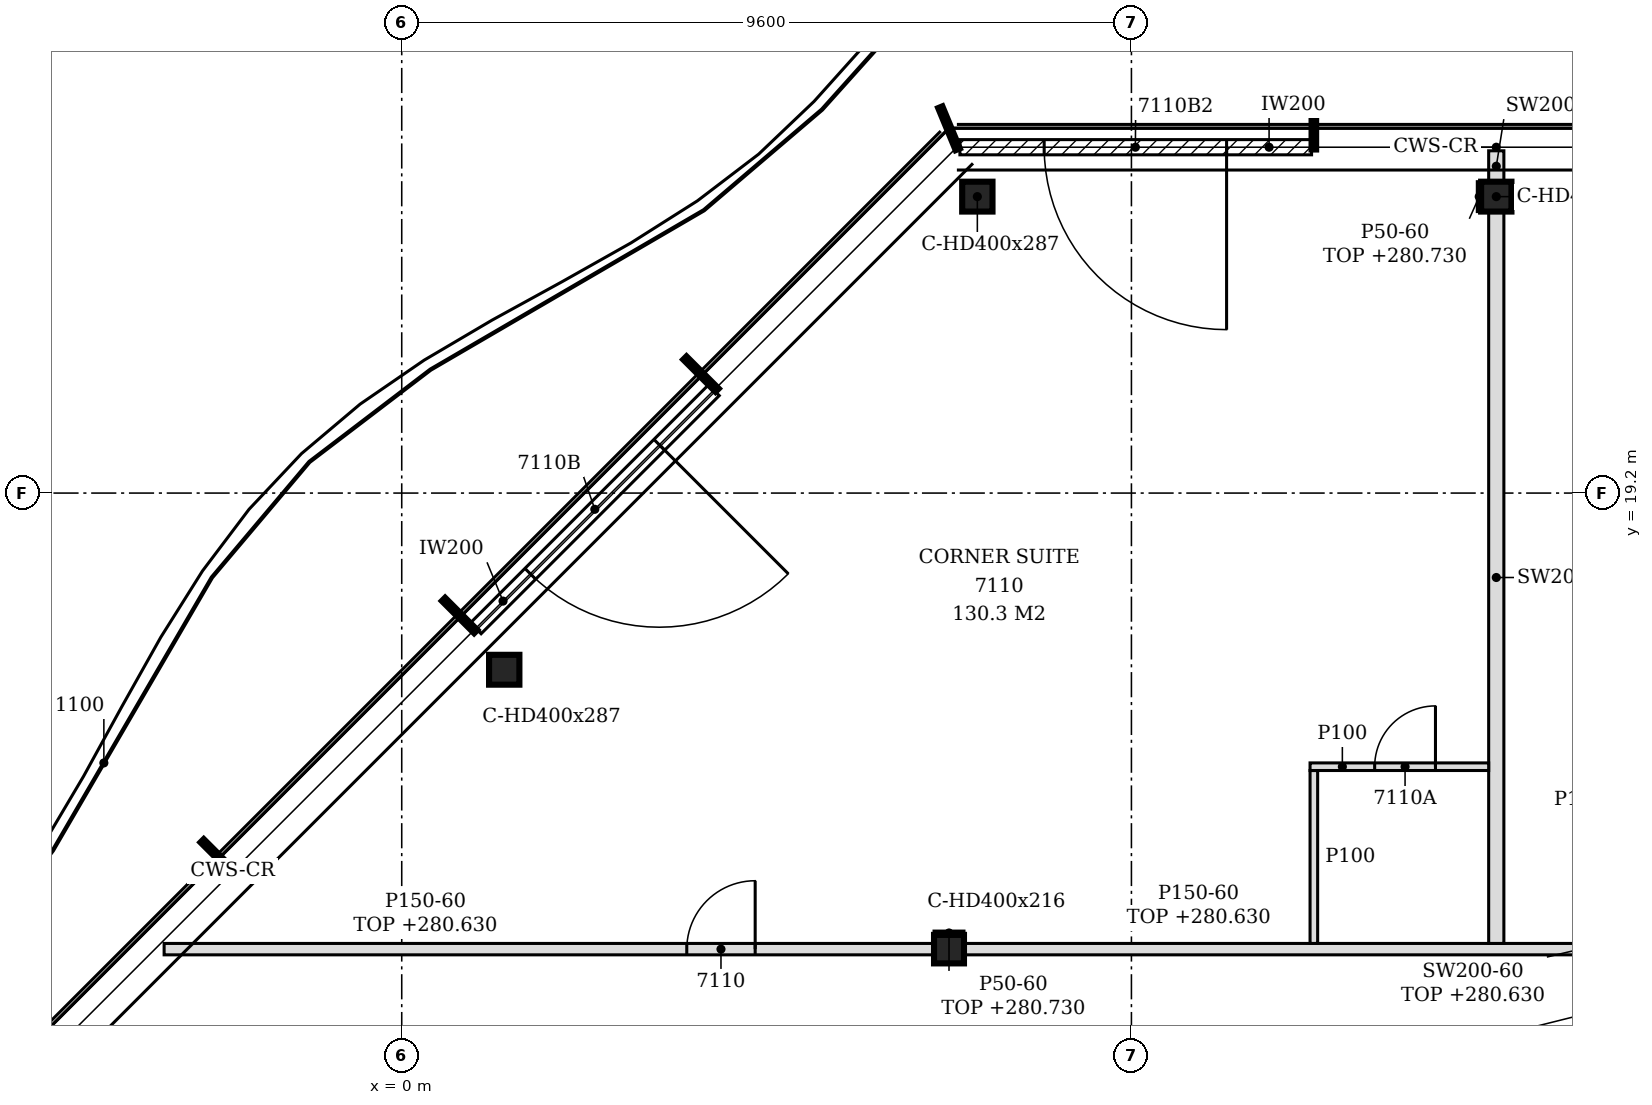
"""IFC4 building model, lengths in metres.
Left out: names, types, materials, properties, quantities, classifications, styles, units other than length and angle.
Written with IfcOpenShell. Run it as: python <this file> out.ifc"""

import sys

from ifc_helpers import new_model, si_unit, direction, frame, frame_2d, origin, origin_2d, place, context, subcontext, project, spatial, polyline, rectangle, i_section, outline, extrude, element, fill, save


model = new_model("IFC4")
c1 = context("Model", 3, precision=1e-05, world=origin(), true_north=direction((0.0, 1.0)))
c2 = subcontext(c1, "Body", "Model", "MODEL_VIEW")
j1 = project(units=[si_unit("LENGTHUNIT", "METRE"), si_unit("PLANEANGLEUNIT", "RADIAN")], contexts=[c1])
p1 = place(None, origin())
s1 = spatial("IfcSite", under=j1, at=p1, CompositionType="ELEMENT")
p2 = place(p1, origin())
s2 = spatial("IfcBuilding", under=s1, at=p2, CompositionType="ELEMENT")
p3 = place(p2, frame((0.0, 0.0, 277.8)))
s3 = spatial("IfcBuildingStorey", under=s2, at=p3, CompositionType="ELEMENT", Elevation=277.8)
for number, where, z_axis, x_axis in (
    (1, (14.4, 23.1, -0.15), (0.0, 0.0, 1.0), (1.0, 0.0, 0.0)),
    (2, (7.573, 23.1, -0.15), (0.0, 0.0, 1.0), (1.0, 0.0, 0.0)),
    (3, (1.348, 16.876, -0.15), (0.0, 0.0, 1.0), (1.0, 0.0, 0.0)),
):
    element("IfcColumn", number, at=place(p3, frame(where, z_axis=z_axis, x_axis=x_axis)), inside=s3, PredefinedType="COLUMN", context=c2, shape_type="SweptSolid", body=[
        extrude(i_section(OverallWidth=0.399, OverallDepth=0.393, WebThickness=0.023, FlangeThickness=0.037, FilletRadius=0.015, at=origin_2d()), origin(), (0.0, 0.0, 1.0), 3.6),
    ])
p4 = place(p3, frame((7.2, 13.2, -0.15), z_axis=(0.0, 0.0, 1.0), x_axis=(1.0, 0.0, 0.0)))
e4 = element("IfcColumn", 4, at=p4, inside=s3, PredefinedType="COLUMN", context=c2, shape_type="SweptSolid", body=[
    extrude(i_section(OverallWidth=0.394, OverallDepth=0.375, WebThickness=0.017, FlangeThickness=0.028, FilletRadius=0.015, at=origin_2d()), origin(), (0.0, 0.0, 1.0), 3.6),
])
p5 = place(p3, frame((11.97, 23.75, 0.0), z_axis=(0.0, 0.0, 1.0), x_axis=(-1.0, 0.0, 0.0)))
e5 = element("IfcWall", 5, at=p5, inside=s3, PredefinedType="NOTDEFINED", context=c2, shape_type="SweptSolid", body=[
    extrude(rectangle(XDim=4.626, YDim=0.2, at=frame_2d((2.313, 0.0))), origin(), (0.0, 0.0, 1.0), 3.45),
])
p6 = place(p5, frame((1.118, 0.0, 0.0)))
e6 = element("IfcOpeningElement", 6, at=p6, cuts=e5, PredefinedType="OPENING", context=c2, shape_type="SweptSolid", body=[
    extrude(rectangle(XDim=2.4, YDim=2.4, at=frame_2d((1.2, 1.2))), frame((0.0, 0.11, 0.0), z_axis=(0.0, -1.0, 0.0), x_axis=(1.0, 0.0, 0.0)), (0.0, 0.0, 1.0), 0.22),
])
p7 = place(p3, frame((4.107, 20.553, 0.0), z_axis=(0.0, 0.0, 1.0), x_axis=(-0.707079231393, -0.707134329907, 0.0)))
e7 = element("IfcWall", 7, at=p7, inside=s3, PredefinedType="NOTDEFINED", context=c2, shape_type="SweptSolid", body=[
    extrude(rectangle(XDim=4.431, YDim=0.2, at=frame_2d((2.215, 0.0))), origin(), (0.0, 0.0, 1.0), 3.45),
])
p8 = place(p7, frame((1.015, 0.0, 0.0)))
e8 = element("IfcOpeningElement", 8, at=p8, cuts=e7, PredefinedType="OPENING", context=c2, shape_type="SweptSolid", body=[
    extrude(rectangle(XDim=2.4, YDim=2.4, at=frame_2d((1.2, 1.2))), frame((0.0, 0.11, 0.0), z_axis=(0.0, -1.0, 0.0), x_axis=(1.0, 0.0, 0.0)), (0.0, 0.0, 1.0), 0.22),
])
p9 = place(p3, frame((-3.126, 13.2, 0.0), z_axis=(0.0, 0.0, 1.0), x_axis=(1.0, 0.0, 0.0)))
e9 = element("IfcWall", 9, at=p9, inside=s3, PredefinedType="PARTITIONING", context=c2, shape_type="SweptSolid", body=[
    extrude(outline(polyline([(0.0, 0.0), (10.129, 0.0), (10.129, 2.83), (1.369, 2.83), (1.367, 2.63), (0.229, 2.63), (0.227, 2.83), (0.0, 2.83), (0.0, 0.0)])), frame((0.0, 0.075, 0.0), z_axis=(0.0, -1.0, 0.0), x_axis=(1.0, 0.0, 0.0)), (0.0, 0.0, 1.0), 0.15),
])
p10 = place(p9, frame((6.876, 0.0, 0.0)))
e10 = element("IfcOpeningElement", 10, at=p10, cuts=e9, PredefinedType="OPENING", context=c2, shape_type="SweptSolid", body=[
    extrude(rectangle(XDim=0.9, YDim=2.1, at=frame_2d((0.45, 1.05))), frame((0.0, 0.085, 0.0), z_axis=(0.0, -1.0, 0.0), x_axis=(1.0, 0.0, 0.0)), (0.0, 0.0, 1.0), 0.17),
])
p11 = place(p3, frame((7.397, 13.2, 0.0), z_axis=(0.0, 0.0, 1.0), x_axis=(1.0, 0.0, 0.0)))
e11 = element("IfcWall", 11, at=p11, inside=s3, PredefinedType="PARTITIONING", context=c2, shape_type="SweptSolid", body=[
    extrude(rectangle(XDim=11.606, YDim=0.15, at=frame_2d((5.803, 0.0))), origin(), (0.0, 0.0, 1.0), 2.83),
])
p12 = place(p11, frame((8.129, 0.0, 0.0)))
e12 = element("IfcOpeningElement", 12, at=p12, cuts=e11, PredefinedType="OPENING", context=c2, shape_type="SweptSolid", body=[
    extrude(rectangle(XDim=0.9, YDim=2.1, at=frame_2d((0.45, 1.05))), frame((0.0, 0.085, 0.0), z_axis=(0.0, -1.0, 0.0), x_axis=(1.0, 0.0, 0.0)), (0.0, 0.0, 1.0), 0.17),
])
p13 = place(p3, frame((12.0, 13.275, 0.0), z_axis=(0.0, 0.0, 1.0), x_axis=(0.0, 1.0, 0.0)))
e13 = element("IfcWall", 13, at=p13, inside=s3, PredefinedType="PARTITIONING", context=c2, shape_type="SweptSolid", body=[
    extrude(outline(polyline([(0.0, 0.0), (2.275, 0.0), (2.275, 3.45), (0.075, 3.45), (0.073, 2.83), (0.0, 2.83), (0.0, 0.0)])), frame((0.0, 0.05, 0.0), z_axis=(0.0, -1.0, 0.0), x_axis=(1.0, 0.0, 0.0)), (0.0, 0.0, 1.0), 0.1),
])
p14 = place(p3, frame((14.4, 13.275, 0.0), z_axis=(0.0, 0.0, 1.0), x_axis=(0.0, 1.0, 0.0)))
e14 = element("IfcWall", 14, at=p14, inside=s3, PredefinedType="PARTITIONING", context=c2, shape_type="SweptSolid", body=[
    extrude(outline(polyline([(0.0, 0.0), (9.629, 0.0), (9.628, 3.45), (6.03, 3.45), (6.028, 2.88), (5.82, 2.88), (5.818, 3.45), (0.075, 3.45), (0.073, 2.83), (0.0, 2.83), (0.0, 0.0)])), frame((0.0, 0.1, 0.0), z_axis=(0.0, -1.0, 0.0), x_axis=(1.0, 0.0, 0.0)), (0.0, 0.0, 1.0), 0.2),
])
p15 = place(p3, frame((11.95, 15.6, 0.0), z_axis=(0.0, 0.0, 1.0), x_axis=(1.0, 0.0, 0.0)))
e15 = element("IfcWall", 15, at=p15, inside=s3, PredefinedType="PARTITIONING", context=c2, shape_type="SweptSolid", body=[
    extrude(rectangle(XDim=2.35, YDim=0.1, at=frame_2d((1.175, 0.0))), origin(), (0.0, 0.0, 1.0), 3.45),
])
p16 = place(p15, frame((0.85, 0.0, 0.0)))
e16 = element("IfcOpeningElement", 16, at=p16, cuts=e15, PredefinedType="OPENING", context=c2, shape_type="SweptSolid", body=[
    extrude(rectangle(XDim=0.8, YDim=2.1, at=frame_2d((0.4, 1.05))), frame((0.0, 0.06, 0.0), z_axis=(0.0, -1.0, 0.0), x_axis=(1.0, 0.0, 0.0)), (0.0, 0.0, 1.0), 0.12),
])
p17 = place(p3, frame((14.4, 23.296, 0.0), z_axis=(0.0, 0.0, 1.0), x_axis=(0.0, 1.0, 0.0)))
e17 = element("IfcWall", 17, at=p17, inside=s3, PredefinedType="PARTITIONING", context=c2, shape_type="SweptSolid", body=[
    extrude(rectangle(XDim=0.406, YDim=0.2, at=frame_2d((0.203, 0.0))), origin(), (0.0, 0.0, 1.0), 3.45),
])
p18 = place(p3, frame((7.003, 13.413, 0.0), z_axis=(0.0, 0.0, 1.0), x_axis=(1.0, 0.0, 0.0)))
e18 = element("IfcWall", 18, at=p18, inside=s3, PredefinedType="PARTITIONING", context=c2, shape_type="SweptSolid", body=[
    extrude(rectangle(XDim=0.394, YDim=0.05, at=frame_2d((0.197, 0.0))), origin(), (0.0, 0.0, 1.0), 2.93),
])
p19 = place(p3, frame((14.176, 22.904, 0.0), z_axis=(0.0, 0.0, 1.0), x_axis=(0.0, 1.0, 0.0)))
e19 = element("IfcWall", 19, at=p19, inside=s3, PredefinedType="PARTITIONING", context=c2, shape_type="SweptSolid", body=[
    extrude(rectangle(XDim=0.393, YDim=0.05, at=frame_2d((0.196, 0.0))), origin(), (0.0, 0.0, 1.0), 2.93),
])
p20 = place(p6, origin())
e20 = element("IfcDoor", 20, at=p20, inside=s3, OperationType="SINGLE_SWING_LEFT", PredefinedType="DOOR", context=c2, shape_type="SweptSolid", body=[
    extrude(rectangle(XDim=2.4, YDim=2.4, at=frame_2d((1.2, 1.2))), frame((0.0, 0.025, 0.0), z_axis=(0.0, -1.0, 0.0), x_axis=(1.0, 0.0, 0.0)), (0.0, 0.0, 1.0), 0.05),
])
fill(e6, e20)
p21 = place(p8, origin())
e21 = element("IfcDoor", 21, at=p21, inside=s3, OperationType="SINGLE_SWING_LEFT", PredefinedType="DOOR", context=c2, shape_type="SweptSolid", body=[
    extrude(rectangle(XDim=2.4, YDim=2.4, at=frame_2d((1.2, 1.2))), frame((0.0, 0.025, 0.0), z_axis=(0.0, -1.0, 0.0), x_axis=(1.0, 0.0, 0.0)), (0.0, 0.0, 1.0), 0.05),
])
fill(e8, e21)
p22 = place(p10, origin())
e22 = element("IfcDoor", 22, at=p22, inside=s3, OperationType="SINGLE_SWING_RIGHT", PredefinedType="DOOR", context=c2, shape_type="SweptSolid", body=[
    extrude(rectangle(XDim=0.9, YDim=2.1, at=frame_2d((0.45, 1.05))), frame((0.0, 0.025, 0.0), z_axis=(0.0, -1.0, 0.0), x_axis=(1.0, 0.0, 0.0)), (0.0, 0.0, 1.0), 0.05),
])
fill(e10, e22)
p23 = place(p16, origin())
e23 = element("IfcDoor", 23, at=p23, inside=s3, OperationType="SINGLE_SWING_RIGHT", PredefinedType="DOOR", context=c2, shape_type="SweptSolid", body=[
    extrude(rectangle(XDim=0.8, YDim=2.1, at=frame_2d((0.4, 1.05))), frame((0.0, 0.025, 0.0), z_axis=(0.0, -1.0, 0.0), x_axis=(1.0, 0.0, 0.0)), (0.0, 0.0, 1.0), 0.05),
])
fill(e16, e23)
save(model, sys.argv[1])
